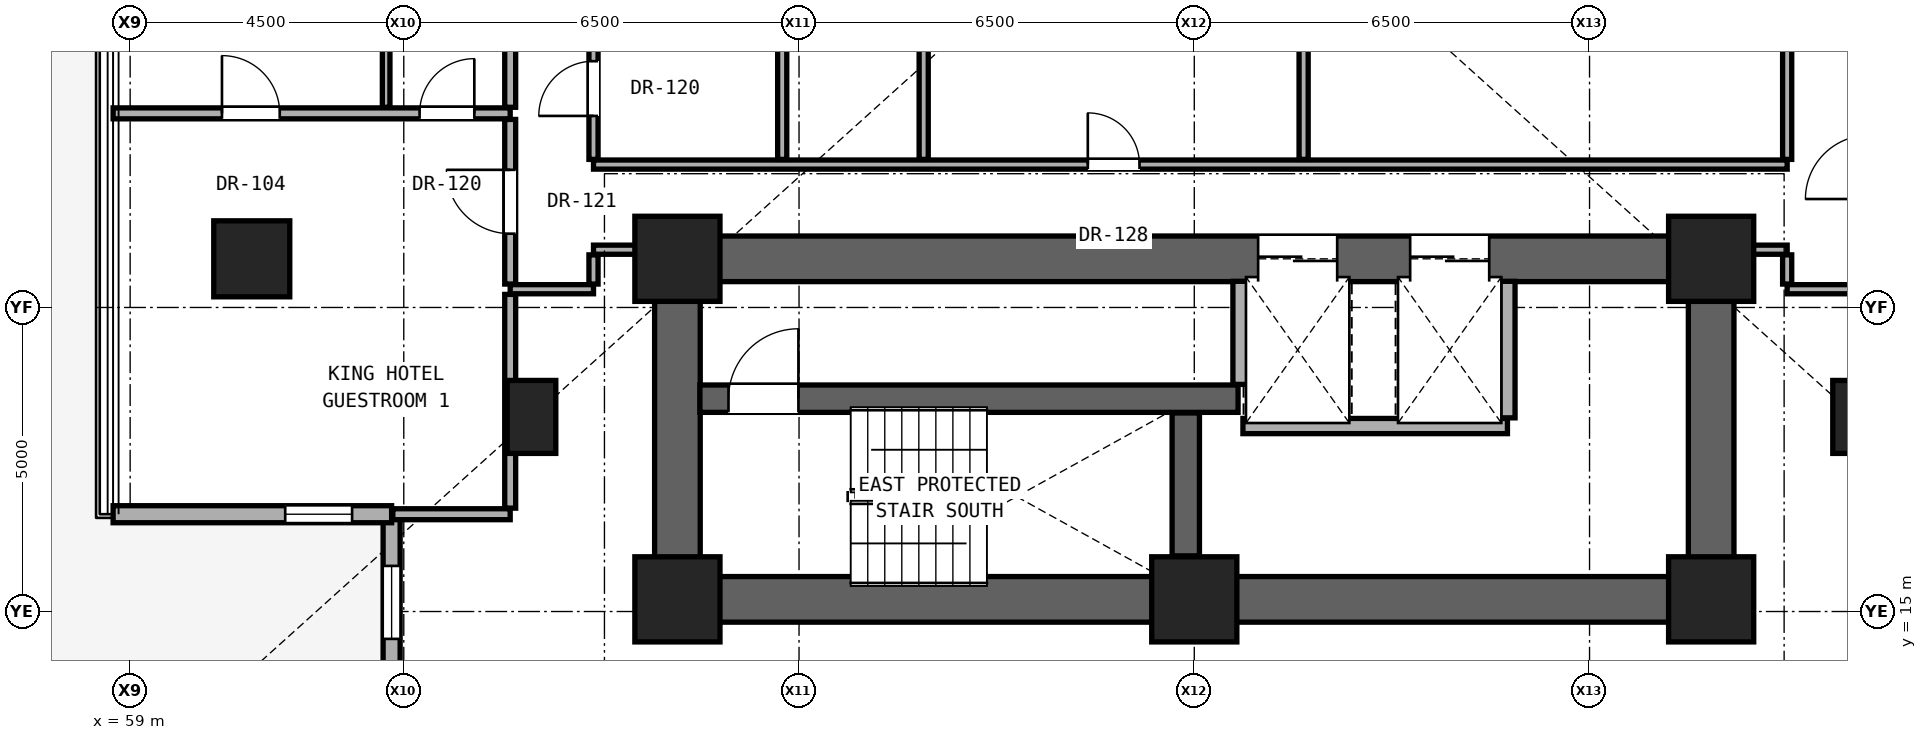
"""IFC4 building model, lengths in metres.
Left out: names, types, materials, properties, quantities, classifications, styles, units other than length and angle.
Written with IfcOpenShell. Run it as: python <this file> out.ifc"""

import sys

from ifc_helpers import new_model, si_unit, direction, frame, frame_2d, origin, origin_2d, place, context, subcontext, project, spatial, rectangle, hollow_rectangle, extrude, element, fill, save


model = new_model("IFC4")
c1 = context("Model", 3, precision=1e-05, world=origin(), true_north=direction((0.0, 1.0)))
c2 = subcontext(c1, "Body", "Model", "MODEL_VIEW")
j1 = project(units=[si_unit("LENGTHUNIT", "METRE"), si_unit("PLANEANGLEUNIT", "RADIAN")], contexts=[c1])
p1 = place(None, origin())
s1 = spatial("IfcSite", under=j1, at=p1, CompositionType="ELEMENT")
p2 = place(p1, origin())
s2 = spatial("IfcBuilding", under=s1, at=p2, CompositionType="ELEMENT")
p3 = place(p2, frame((0.0, 0.0, 22.4)))
s3 = spatial("IfcBuildingStorey", under=s2, at=p3, CompositionType="ELEMENT", Elevation=22.4)
for number, where, z_axis, x_axis in (
    (1, (68.0, 15.2, 0.0), (0.0, 0.0, 1.0), (1.0, 0.0, 0.0)),
    (2, (76.5, 15.2, 0.0), (0.0, 0.0, 1.0), (1.0, 0.0, 0.0)),
    (3, (85.0, 15.2, 0.0), (0.0, 0.0, 1.0), (1.0, 0.0, 0.0)),
    (4, (68.0, 20.8, 0.0), (0.0, 0.0, 1.0), (1.0, 0.0, 0.0)),
    (5, (85.0, 20.8, 0.0), (0.0, 0.0, 1.0), (1.0, 0.0, 0.0)),
):
    element("IfcColumn", number, at=place(p3, frame(where, z_axis=z_axis, x_axis=x_axis)), inside=s3, PredefinedType="COLUMN", context=c2, shape_type="SweptSolid", body=[
        extrude(rectangle(XDim=1.4, YDim=1.4, at=origin_2d()), origin(), (0.0, 0.0, 1.0), 3.3),
    ])
p4 = place(p3, frame((61.0, 20.8, 0.0), z_axis=(0.0, 0.0, 1.0), x_axis=(1.0, 0.0, 0.0)))
e6 = element("IfcColumn", 6, at=p4, inside=s3, PredefinedType="COLUMN", context=c2, shape_type="SweptSolid", body=[
    extrude(hollow_rectangle(XDim=1.25, YDim=1.25, WallThickness=0.07, at=origin_2d()), origin(), (0.0, 0.0, 1.0), 3.3),
])
for number, where, z_axis, x_axis in (
    (7, (65.6, 18.2, 0.0), (0.0, 0.0, 1.0), (1.0, 0.0, 0.0)),
    (8, (87.4, 18.2, 0.0), (0.0, 0.0, 1.0), (1.0, 0.0, 0.0)),
):
    element("IfcColumn", number, at=place(p3, frame(where, z_axis=z_axis, x_axis=x_axis)), inside=s3, PredefinedType="PILASTER", context=c2, shape_type="SweptSolid", body=[
        extrude(rectangle(XDim=0.8, YDim=1.2, at=origin_2d()), origin(), (0.0, 0.0, 1.0), 3.3),
    ])
p5 = place(p3, frame((68.0, 15.2, 0.0), z_axis=(0.0, 0.0, 1.0), x_axis=(1.0, 0.0, 0.0)))
e9 = element("IfcWall", 9, at=p5, inside=s3, PredefinedType="SHEAR", context=c2, shape_type="SweptSolid", body=[
    extrude(rectangle(XDim=17.0, YDim=0.75, at=frame_2d((8.5, 0.0))), origin(), (0.0, 0.0, 1.0), 3.06),
])
for number, where, z_axis, x_axis in (
    (10, (68.0, 15.2, 0.0), (0.0, 0.0, 1.0), (0.0, 1.0, 0.0)),
    (11, (85.0, 15.2, 0.0), (0.0, 0.0, 1.0), (0.0, 1.0, 0.0)),
):
    element("IfcWall", number, at=place(p3, frame(where, z_axis=z_axis, x_axis=x_axis)), inside=s3, PredefinedType="SHEAR", context=c2, shape_type="SweptSolid", body=[
        extrude(rectangle(XDim=5.6, YDim=0.75, at=frame_2d((2.8, 0.0))), origin(), (0.0, 0.0, 1.0), 3.06),
    ])
p6 = place(p3, frame((68.0, 20.8, 0.0), z_axis=(0.0, 0.0, 1.0), x_axis=(1.0, 0.0, 0.0)))
e12 = element("IfcWall", 12, at=p6, inside=s3, PredefinedType="SHEAR", context=c2, shape_type="SweptSolid", body=[
    extrude(rectangle(XDim=17.0, YDim=0.75, at=frame_2d((8.5, 0.0))), origin(), (0.0, 0.0, 1.0), 3.06),
])
p7 = place(p6, frame((9.55, 0.0, 0.0)))
e13 = element("IfcOpeningElement", 13, at=p7, cuts=e12, PredefinedType="OPENING", context=c2, shape_type="SweptSolid", body=[
    extrude(rectangle(XDim=1.3, YDim=2.3, at=frame_2d((0.65, 1.15))), frame((0.0, 0.385, 0.0), z_axis=(0.0, -1.0, 0.0), x_axis=(1.0, 0.0, 0.0)), (0.0, 0.0, 1.0), 0.77),
])
p8 = place(p6, frame((12.05, 0.0, 0.0)))
e14 = element("IfcOpeningElement", 14, at=p8, cuts=e12, PredefinedType="OPENING", context=c2, shape_type="SweptSolid", body=[
    extrude(rectangle(XDim=1.3, YDim=2.3, at=frame_2d((0.65, 1.15))), frame((0.0, 0.385, 0.0), z_axis=(0.0, -1.0, 0.0), x_axis=(1.0, 0.0, 0.0)), (0.0, 0.0, 1.0), 0.77),
])
p9 = place(p3, frame((63.3, 16.6, 0.0), z_axis=(0.0, 0.0, 1.0), x_axis=(0.0, -1.0, 0.0)))
e15 = element("IfcWall", 15, at=p9, inside=s3, PredefinedType="SOLIDWALL", context=c2, shape_type="SweptSolid", body=[
    extrude(rectangle(XDim=4.58, YDim=0.28, at=frame_2d((2.29, 0.0))), origin(), (0.0, 0.0, 1.0), 3.04),
])
p10 = place(p9, frame((0.85, 0.0, 0.79)))
e16 = element("IfcOpeningElement", 16, at=p10, cuts=e15, PredefinedType="OPENING", context=c2, shape_type="SweptSolid", body=[
    extrude(rectangle(XDim=1.2, YDim=2.1, at=frame_2d((0.6, 1.05))), frame((0.0, 0.15, 0.0), z_axis=(0.0, -1.0, 0.0), x_axis=(1.0, 0.0, 0.0)), (0.0, 0.0, 1.0), 0.3),
])
p11 = place(p3, frame((58.72, 16.6, 0.0), z_axis=(0.0, 0.0, 1.0), x_axis=(1.0, 0.0, 0.0)))
e17 = element("IfcWall", 17, at=p11, inside=s3, PredefinedType="SOLIDWALL", context=c2, shape_type="SweptSolid", body=[
    extrude(rectangle(XDim=4.58, YDim=0.28, at=frame_2d((2.29, 0.0))), origin(), (0.0, 0.0, 1.0), 3.04),
])
p12 = place(p11, frame((2.83, 0.0, 0.85)))
e18 = element("IfcOpeningElement", 18, at=p12, cuts=e17, PredefinedType="OPENING", context=c2, shape_type="SweptSolid", body=[
    extrude(rectangle(XDim=1.1, YDim=2.0, at=frame_2d((0.55, 1.0))), frame((0.0, 0.15, 0.0), z_axis=(0.0, -1.0, 0.0), x_axis=(1.0, 0.0, 0.0)), (0.0, 0.0, 1.0), 0.3),
])
p13 = place(p3, frame((63.32, 16.6, 0.0), z_axis=(0.0, 0.0, 1.0), x_axis=(1.0, 0.0, 0.0)))
e19 = element("IfcWall", 19, at=p13, inside=s3, PredefinedType="PARTITIONING", context=c2, shape_type="SweptSolid", body=[
    extrude(rectangle(XDim=1.93, YDim=0.18, at=frame_2d((0.965, 0.0))), origin(), (0.0, 0.0, 1.0), 3.06),
])
p14 = place(p3, frame((77.3, 18.05, 0.0), z_axis=(0.0, 0.0, 1.0), x_axis=(1.0, 0.0, 0.0)))
e20 = element("IfcWall", 20, at=p14, inside=s3, PredefinedType="SOLIDWALL", context=c2, shape_type="SweptSolid", body=[
    extrude(rectangle(XDim=4.35, YDim=0.25, at=frame_2d((2.175, 0.0))), origin(), (0.0, 0.0, 1.0), 3.06),
])
p15 = place(p3, frame((68.37, 18.5, 0.0), z_axis=(0.0, 0.0, 1.0), x_axis=(1.0, 0.0, 0.0)))
e21 = element("IfcWall", 21, at=p15, inside=s3, PredefinedType="SHEAR", context=c2, shape_type="SweptSolid", body=[
    extrude(rectangle(XDim=8.85, YDim=0.45, at=frame_2d((4.425, 0.0))), origin(), (0.0, 0.0, 1.0), 3.06),
])
p16 = place(p15, frame((0.47, 0.0, 0.0)))
e22 = element("IfcOpeningElement", 22, at=p16, cuts=e21, PredefinedType="OPENING", context=c2, shape_type="SweptSolid", body=[
    extrude(rectangle(XDim=1.15, YDim=2.2, at=frame_2d((0.575, 1.1))), frame((0.0, 0.235, 0.0), z_axis=(0.0, -1.0, 0.0), x_axis=(1.0, 0.0, 0.0)), (0.0, 0.0, 1.0), 0.47),
])
p17 = place(p3, frame((65.25, 20.3, 0.0), z_axis=(0.0, 0.0, 1.0), x_axis=(1.0, 0.0, 0.0)))
e23 = element("IfcWall", 23, at=p17, inside=s3, PredefinedType="PARTITIONING", context=c2, shape_type="SweptSolid", body=[
    extrude(rectangle(XDim=1.37, YDim=0.15, at=frame_2d((0.685, 0.0))), origin(), (0.0, 0.0, 1.0), 3.06),
])
p18 = place(p3, frame((86.25, 20.3, 0.0), z_axis=(0.0, 0.0, 1.0), x_axis=(1.0, 0.0, 0.0)))
e24 = element("IfcWall", 24, at=p18, inside=s3, PredefinedType="PARTITIONING", context=c2, shape_type="SweptSolid", body=[
    extrude(rectangle(XDim=1.35, YDim=0.15, at=frame_2d((0.675, 0.0))), origin(), (0.0, 0.0, 1.0), 3.06),
])
p19 = place(p3, frame((66.62, 20.95, 0.0), z_axis=(0.0, 0.0, 1.0), x_axis=(1.0, 0.0, 0.0)))
e25 = element("IfcWall", 25, at=p19, inside=s3, PredefinedType="PARTITIONING", context=c2, shape_type="SweptSolid", body=[
    extrude(rectangle(XDim=1.01, YDim=0.15, at=frame_2d((0.505, 0.0))), origin(), (0.0, 0.0, 1.0), 2.452),
])
p20 = place(p3, frame((85.37, 20.95, 0.0), z_axis=(0.0, 0.0, 1.0), x_axis=(1.0, 0.0, 0.0)))
e26 = element("IfcWall", 26, at=p20, inside=s3, PredefinedType="PARTITIONING", context=c2, shape_type="SweptSolid", body=[
    extrude(rectangle(XDim=0.88, YDim=0.15, at=frame_2d((0.44, 0.0))), origin(), (0.0, 0.0, 1.0), 2.452),
])
p21 = place(p3, frame((66.62, 22.35, 0.0), z_axis=(0.0, 0.0, 1.0), x_axis=(1.0, 0.0, 0.0)))
e27 = element("IfcWall", 27, at=p21, inside=s3, PredefinedType="PARTITIONING", context=c2, shape_type="SweptSolid", body=[
    extrude(rectangle(XDim=19.63, YDim=0.15, at=frame_2d((9.815, 0.0))), origin(), (0.0, 0.0, 1.0), 2.125),
])
p22 = place(p21, frame((8.129, 0.0, 0.0)))
e28 = element("IfcOpeningElement", 28, at=p22, cuts=e27, PredefinedType="OPENING", context=c2, shape_type="SweptSolid", body=[
    extrude(rectangle(XDim=0.85, YDim=2.01, at=frame_2d((0.425, 1.005))), frame((0.0, 0.085, 0.0), z_axis=(0.0, -1.0, 0.0), x_axis=(1.0, 0.0, 0.0)), (0.0, 0.0, 1.0), 0.17),
])
p23 = place(p3, frame((58.72, 23.192, 0.0), z_axis=(0.0, 0.0, 1.0), x_axis=(1.0, 0.0, 0.0)))
e29 = element("IfcWall", 29, at=p23, inside=s3, PredefinedType="PARTITIONING", context=c2, shape_type="SweptSolid", body=[
    extrude(rectangle(XDim=6.53, YDim=0.18, at=frame_2d((3.265, 0.0))), origin(), (0.0, 0.0, 1.0), 2.196),
])
p24 = place(p23, frame((1.79, 0.0, 0.0)))
e30 = element("IfcOpeningElement", 30, at=p24, cuts=e29, PredefinedType="OPENING", context=c2, shape_type="SweptSolid", body=[
    extrude(rectangle(XDim=0.95, YDim=2.15, at=frame_2d((0.475, 1.075))), frame((0.0, 0.1, 0.0), z_axis=(0.0, -1.0, 0.0), x_axis=(1.0, 0.0, 0.0)), (0.0, 0.0, 1.0), 0.2),
])
p25 = place(p23, frame((5.04, 0.0, 0.0)))
e31 = element("IfcOpeningElement", 31, at=p25, cuts=e29, PredefinedType="OPENING", context=c2, shape_type="SweptSolid", body=[
    extrude(rectangle(XDim=0.9, YDim=2.1, at=frame_2d((0.45, 1.05))), frame((0.0, 0.1, 0.0), z_axis=(0.0, -1.0, 0.0), x_axis=(1.0, 0.0, 0.0)), (0.0, 0.0, 1.0), 0.2),
])
p26 = place(p3, frame((63.21, 23.292, 0.0), z_axis=(0.0, 0.0, 1.0), x_axis=(0.0, 1.0, 0.0)))
e32 = element("IfcWall", 32, at=p26, inside=s3, PredefinedType="PARTITIONING", context=c2, shape_type="SweptSolid", body=[
    extrude(rectangle(XDim=2.127, YDim=0.125, at=frame_2d((1.064, 0.0))), origin(), (0.0, 0.0, 1.0), 3.06),
])
p27 = place(p3, frame((65.25, 16.7, 0.0), z_axis=(0.0, 0.0, 1.0), x_axis=(0.0, 1.0, 0.0)))
e33 = element("IfcWall", 33, at=p27, inside=s3, PredefinedType="PARTITIONING", context=c2, shape_type="SweptSolid", body=[
    extrude(rectangle(XDim=3.515, YDim=0.18, at=frame_2d((1.758, 0.0))), origin(), (0.0, 0.0, 1.0), 2.436),
])
p28 = place(p3, frame((65.25, 20.385, 0.0), z_axis=(0.0, 0.0, 1.0), x_axis=(0.0, 1.0, 0.0)))
e34 = element("IfcWall", 34, at=p28, inside=s3, PredefinedType="PARTITIONING", context=c2, shape_type="SweptSolid", body=[
    extrude(rectangle(XDim=2.707, YDim=0.18, at=frame_2d((1.354, 0.0))), origin(), (0.0, 0.0, 1.0), 2.452),
])
p29 = place(p28, frame((0.829, 0.0, 0.0)))
e35 = element("IfcOpeningElement", 35, at=p29, cuts=e34, PredefinedType="OPENING", context=c2, shape_type="SweptSolid", body=[
    extrude(rectangle(XDim=1.05, YDim=2.2, at=frame_2d((0.525, 1.1))), frame((0.0, 0.1, 0.0), z_axis=(0.0, -1.0, 0.0), x_axis=(1.0, 0.0, 0.0)), (0.0, 0.0, 1.0), 0.2),
])
p30 = place(p3, frame((65.25, 23.292, 0.0), z_axis=(0.0, 0.0, 1.0), x_axis=(0.0, 1.0, 0.0)))
e36 = element("IfcWall", 36, at=p30, inside=s3, PredefinedType="PARTITIONING", context=c2, shape_type="SweptSolid", body=[
    extrude(rectangle(XDim=2.127, YDim=0.18, at=frame_2d((1.064, 0.0))), origin(), (0.0, 0.0, 1.0), 3.06),
])
p31 = place(p3, frame((66.62, 20.385, 0.0), z_axis=(0.0, 0.0, 1.0), x_axis=(0.0, 1.0, 0.0)))
e37 = element("IfcWall", 37, at=p31, inside=s3, PredefinedType="PARTITIONING", context=c2, shape_type="SweptSolid", body=[
    extrude(rectangle(XDim=0.48, YDim=0.15, at=frame_2d((0.24, 0.0))), origin(), (0.0, 0.0, 1.0), 2.452),
])
p32 = place(p3, frame((66.62, 22.435, 0.0), z_axis=(0.0, 0.0, 1.0), x_axis=(0.0, 1.0, 0.0)))
e38 = element("IfcWall", 38, at=p32, inside=s3, PredefinedType="PARTITIONING", context=c2, shape_type="SweptSolid", body=[
    extrude(rectangle(XDim=2.33, YDim=0.15, at=frame_2d((1.165, 0.0))), origin(), (0.0, 0.0, 1.0), 3.06),
])
p33 = place(p32, frame((0.715, 0.0, 0.0)))
e39 = element("IfcOpeningElement", 39, at=p33, cuts=e38, PredefinedType="OPENING", context=c2, shape_type="SweptSolid", body=[
    extrude(rectangle(XDim=0.9, YDim=2.1, at=frame_2d((0.45, 1.05))), frame((0.0, 0.085, 0.0), z_axis=(0.0, -1.0, 0.0), x_axis=(1.0, 0.0, 0.0)), (0.0, 0.0, 1.0), 0.17),
])
p34 = place(p3, frame((69.723, 22.435, 0.0), z_axis=(0.0, 0.0, 1.0), x_axis=(0.0, 1.0, 0.0)))
e40 = element("IfcWall", 40, at=p34, inside=s3, PredefinedType="PARTITIONING", context=c2, shape_type="SweptSolid", body=[
    extrude(rectangle(XDim=2.33, YDim=0.15, at=frame_2d((1.165, 0.0))), origin(), (0.0, 0.0, 1.0), 3.06),
])
p35 = place(p3, frame((72.05, 22.435, 0.0), z_axis=(0.0, 0.0, 1.0), x_axis=(0.0, 1.0, 0.0)))
e41 = element("IfcWall", 41, at=p35, inside=s3, PredefinedType="PARTITIONING", context=c2, shape_type="SweptSolid", body=[
    extrude(rectangle(XDim=8.13, YDim=0.15, at=frame_2d((4.065, 0.0))), origin(), (0.0, 0.0, 1.0), 2.125),
])
p36 = place(p3, frame((76.36, 15.915, 0.0), z_axis=(0.0, 0.0, 1.0), x_axis=(0.0, 1.0, 0.0)))
e42 = element("IfcWall", 42, at=p36, inside=s3, PredefinedType="SHEAR", context=c2, shape_type="SweptSolid", body=[
    extrude(rectangle(XDim=2.35, YDim=0.45, at=frame_2d((1.175, 0.0))), origin(), (0.0, 0.0, 1.0), 3.06),
])
p37 = place(p3, frame((77.26, 18.735, 0.0), z_axis=(0.0, 0.0, 1.0), x_axis=(0.0, 1.0, 0.0)))
e43 = element("IfcWall", 43, at=p37, inside=s3, PredefinedType="SOLIDWALL", context=c2, shape_type="SweptSolid", body=[
    extrude(rectangle(XDim=1.695, YDim=0.25, at=frame_2d((0.847, 0.0))), origin(), (0.0, 0.0, 1.0), 3.06),
])
p38 = place(p3, frame((78.298, 22.435, 0.0), z_axis=(0.0, 0.0, 1.0), x_axis=(0.0, 1.0, 0.0)))
e44 = element("IfcWall", 44, at=p38, inside=s3, PredefinedType="PARTITIONING", context=c2, shape_type="SweptSolid", body=[
    extrude(rectangle(XDim=8.13, YDim=0.15, at=frame_2d((4.065, 0.0))), origin(), (0.0, 0.0, 1.0), 2.125),
])
p39 = place(p3, frame((81.65, 18.185, 0.0), z_axis=(0.0, 0.0, 1.0), x_axis=(0.0, 1.0, 0.0)))
e45 = element("IfcWall", 45, at=p39, inside=s3, PredefinedType="SOLIDWALL", context=c2, shape_type="SweptSolid", body=[
    extrude(rectangle(XDim=2.245, YDim=0.25, at=frame_2d((1.123, 0.0))), origin(), (0.0, 0.0, 1.0), 3.06),
])
p40 = place(p3, frame((86.25, 20.385, 0.0), z_axis=(0.0, 0.0, 1.0), x_axis=(0.0, 1.0, 0.0)))
e46 = element("IfcWall", 46, at=p40, inside=s3, PredefinedType="PARTITIONING", context=c2, shape_type="SweptSolid", body=[
    extrude(rectangle(XDim=0.48, YDim=0.15, at=frame_2d((0.24, 0.0))), origin(), (0.0, 0.0, 1.0), 2.452),
])
p41 = place(p3, frame((86.25, 22.435, 0.0), z_axis=(0.0, 0.0, 1.0), x_axis=(0.0, 1.0, 0.0)))
e47 = element("IfcWall", 47, at=p41, inside=s3, PredefinedType="PARTITIONING", context=c2, shape_type="SweptSolid", body=[
    extrude(rectangle(XDim=8.13, YDim=0.15, at=frame_2d((4.065, 0.0))), origin(), (0.0, 0.0, 1.0), 2.279),
])
p42 = place(p10, origin())
e48 = element("IfcWindow", 48, at=p42, inside=s3, PartitioningType="SINGLE_PANEL", PredefinedType="WINDOW", context=c2, shape_type="SweptSolid", body=[
    extrude(rectangle(XDim=1.2, YDim=2.1, at=frame_2d((0.6, 1.05))), frame((0.0, 0.03, 0.0), z_axis=(0.0, -1.0, 0.0), x_axis=(1.0, 0.0, 0.0)), (0.0, 0.0, 1.0), 0.06),
])
fill(e16, e48)
p43 = place(p12, origin())
e49 = element("IfcWindow", 49, at=p43, inside=s3, PartitioningType="SINGLE_PANEL", PredefinedType="WINDOW", context=c2, shape_type="SweptSolid", body=[
    extrude(rectangle(XDim=1.1, YDim=2.0, at=frame_2d((0.55, 1.0))), frame((0.0, 0.03, 0.0), z_axis=(0.0, -1.0, 0.0), x_axis=(1.0, 0.0, 0.0)), (0.0, 0.0, 1.0), 0.06),
])
fill(e18, e49)
p44 = place(p16, origin())
e50 = element("IfcDoor", 50, at=p44, inside=s3, OperationType="SINGLE_SWING_RIGHT", PredefinedType="DOOR", context=c2, shape_type="SweptSolid", body=[
    extrude(rectangle(XDim=1.15, YDim=2.2, at=frame_2d((0.575, 1.1))), frame((0.0, 0.025, 0.0), z_axis=(0.0, -1.0, 0.0), x_axis=(1.0, 0.0, 0.0)), (0.0, 0.0, 1.0), 0.05),
])
fill(e22, e50)
p45 = place(p33, origin())
e51 = element("IfcDoor", 51, at=p45, inside=s3, OperationType="SINGLE_SWING_LEFT", PredefinedType="DOOR", context=c2, shape_type="SweptSolid", body=[
    extrude(rectangle(XDim=0.9, YDim=2.1, at=frame_2d((0.45, 1.05))), frame((0.0, 0.025, 0.0), z_axis=(0.0, -1.0, 0.0), x_axis=(1.0, 0.0, 0.0)), (0.0, 0.0, 1.0), 0.05),
])
fill(e39, e51)
p46 = place(p29, origin())
e52 = element("IfcDoor", 52, at=p46, inside=s3, OperationType="SINGLE_SWING_RIGHT", PredefinedType="DOOR", context=c2, shape_type="SweptSolid", body=[
    extrude(rectangle(XDim=1.05, YDim=2.2, at=frame_2d((0.525, 1.1))), frame((0.0, 0.025, 0.0), z_axis=(0.0, -1.0, 0.0), x_axis=(1.0, 0.0, 0.0)), (0.0, 0.0, 1.0), 0.05),
])
fill(e35, e52)
p47 = place(p24, origin())
e53 = element("IfcDoor", 53, at=p47, inside=s3, OperationType="SINGLE_SWING_LEFT", PredefinedType="DOOR", context=c2, shape_type="SweptSolid", body=[
    extrude(rectangle(XDim=0.95, YDim=2.15, at=frame_2d((0.475, 1.075))), frame((0.0, 0.025, 0.0), z_axis=(0.0, -1.0, 0.0), x_axis=(1.0, 0.0, 0.0)), (0.0, 0.0, 1.0), 0.05),
])
fill(e30, e53)
p48 = place(p25, origin())
e54 = element("IfcDoor", 54, at=p48, inside=s3, OperationType="SINGLE_SWING_RIGHT", PredefinedType="DOOR", context=c2, shape_type="SweptSolid", body=[
    extrude(rectangle(XDim=0.9, YDim=2.1, at=frame_2d((0.45, 1.05))), frame((0.0, 0.025, 0.0), z_axis=(0.0, -1.0, 0.0), x_axis=(1.0, 0.0, 0.0)), (0.0, 0.0, 1.0), 0.05),
])
fill(e31, e54)
p49 = place(p22, origin())
e55 = element("IfcDoor", 55, at=p49, inside=s3, OperationType="SINGLE_SWING_LEFT", PredefinedType="DOOR", context=c2, shape_type="SweptSolid", body=[
    extrude(rectangle(XDim=0.85, YDim=2.01, at=frame_2d((0.425, 1.005))), frame((0.0, 0.025, 0.0), z_axis=(0.0, -1.0, 0.0), x_axis=(1.0, 0.0, 0.0)), (0.0, 0.0, 1.0), 0.05),
])
fill(e28, e55)
p50 = place(p7, origin())
e56 = element("IfcDoor", 56, at=p50, inside=s3, OperationType="DOUBLE_DOOR_SLIDING", PredefinedType="DOOR", context=c2, shape_type="SweptSolid", body=[
    extrude(rectangle(XDim=1.3, YDim=2.3, at=frame_2d((0.65, 1.15))), frame((0.0, 0.025, 0.0), z_axis=(0.0, -1.0, 0.0), x_axis=(1.0, 0.0, 0.0)), (0.0, 0.0, 1.0), 0.05),
])
fill(e13, e56)
p51 = place(p8, origin())
e57 = element("IfcDoor", 57, at=p51, inside=s3, OperationType="DOUBLE_DOOR_SLIDING", PredefinedType="DOOR", context=c2, shape_type="SweptSolid", body=[
    extrude(rectangle(XDim=1.3, YDim=2.3, at=frame_2d((0.65, 1.15))), frame((0.0, 0.025, 0.0), z_axis=(0.0, -1.0, 0.0), x_axis=(1.0, 0.0, 0.0)), (0.0, 0.0, 1.0), 0.05),
])
fill(e14, e57)
save(model, sys.argv[1])
